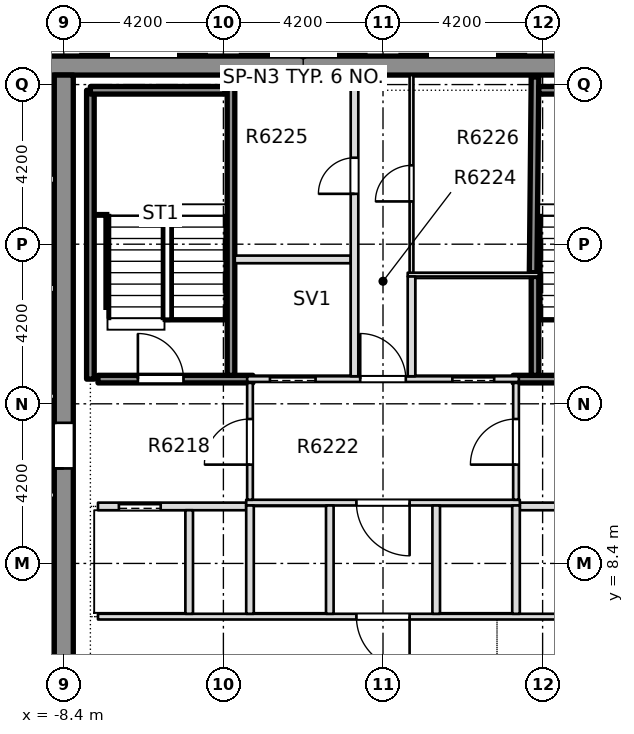
"""IFC4 building model, lengths in metres.
Left out: names, types, materials, properties, quantities, classifications, styles, units other than length and angle.
Written with IfcOpenShell. Run it as: python <this file> out.ifc"""

import sys

from ifc_helpers import new_model, si_unit, direction, frame, frame_2d, origin, place, context, subcontext, project, spatial, rectangle, extrude, element, fill, save


model = new_model("IFC4")
c1 = context("Model", 3, precision=1e-05, world=origin(), true_north=direction((0.0, 1.0)))
c2 = subcontext(c1, "Body", "Model", "MODEL_VIEW")
j1 = project(units=[si_unit("LENGTHUNIT", "METRE"), si_unit("PLANEANGLEUNIT", "RADIAN")], contexts=[c1])
p1 = place(None, origin())
s1 = spatial("IfcSite", under=j1, at=p1, CompositionType="ELEMENT")
p2 = place(p1, origin())
s2 = spatial("IfcBuilding", under=s1, at=p2, CompositionType="ELEMENT")
p3 = place(p2, frame((0.0, 0.0, 237.25)))
s3 = spatial("IfcBuildingStorey", under=s2, at=p3, CompositionType="ELEMENT", Elevation=237.25)
p4 = place(p3, frame((-12.1, 21.5, -0.4), z_axis=(0.0, 0.0, 1.0), x_axis=(1.0, 0.0, 0.0)))
e1 = element("IfcWall", 1, at=p4, inside=s3, PredefinedType="SHEAR", context=c2, shape_type="SweptSolid", body=[
    extrude(rectangle(XDim=24.2, YDim=0.5, at=frame_2d((12.1, 0.0))), origin(), (0.0, 0.0, 1.0), 3.45),
])
p5 = place(p3, frame((-8.4, -7.9, -0.4), z_axis=(0.0, 0.0, 1.0), x_axis=(0.0, 1.0, 0.0)))
e2 = element("IfcWall", 2, at=p5, inside=s3, PredefinedType="SHEAR", context=c2, shape_type="SweptSolid", body=[
    extrude(rectangle(XDim=29.15, YDim=0.5, at=frame_2d((14.575, 0.0))), origin(), (0.0, 0.0, 1.0), 3.45),
])
p6 = place(p5, frame((18.8, 0.0, 0.4)))
e3 = element("IfcOpeningElement", 3, at=p6, cuts=e2, PredefinedType="OPENING", context=c2, shape_type="SweptSolid", body=[
    extrude(rectangle(XDim=1.2, YDim=2.1, at=frame_2d((0.6, 1.05))), frame((0.0, 0.26, 0.0), z_axis=(0.0, -1.0, 0.0), x_axis=(1.0, 0.0, 0.0)), (0.0, 0.0, 1.0), 0.52),
])
p7 = place(p3, frame((-7.5, 7.0, 0.0), z_axis=(0.0, 0.0, 1.0), x_axis=(1.0, 0.0, 0.0)))
e4 = element("IfcWall", 4, at=p7, inside=s3, PredefinedType="PARTITIONING", context=c2, shape_type="SweptSolid", body=[
    extrude(rectangle(XDim=15.0, YDim=0.15, at=frame_2d((7.5, 0.0))), origin(), (0.0, 0.0, 1.0), 3.05),
])
p8 = place(p7, frame((6.8, 0.0, 0.0)))
e5 = element("IfcOpeningElement", 5, at=p8, cuts=e4, PredefinedType="OPENING", context=c2, shape_type="SweptSolid", body=[
    extrude(rectangle(XDim=1.4, YDim=2.1, at=frame_2d((0.7, 1.05))), frame((0.0, 0.085, 0.0), z_axis=(0.0, -1.0, 0.0), x_axis=(1.0, 0.0, 0.0)), (0.0, 0.0, 1.0), 0.17),
])
p9 = place(p3, frame((-7.5, 9.9, 0.0), z_axis=(0.0, 0.0, 1.0), x_axis=(1.0, 0.0, 0.0)))
e6 = element("IfcWall", 6, at=p9, inside=s3, PredefinedType="PARTITIONING", context=c2, shape_type="SweptSolid", body=[
    extrude(rectangle(XDim=3.9, YDim=0.2, at=frame_2d((1.95, 0.0))), origin(), (0.0, 0.0, 1.0), 3.05),
])
p10 = place(p9, frame((0.55, 0.0, 0.0)))
e7 = element("IfcOpeningElement", 7, at=p10, cuts=e6, PredefinedType="OPENING", context=c2, shape_type="SweptSolid", body=[
    extrude(rectangle(XDim=1.1, YDim=2.1, at=frame_2d((0.55, 1.05))), frame((0.0, 0.11, 0.0), z_axis=(0.0, -1.0, 0.0), x_axis=(1.0, 0.0, 0.0)), (0.0, 0.0, 1.0), 0.22),
])
p11 = place(p3, frame((3.6, 9.9, 0.0), z_axis=(0.0, 0.0, 1.0), x_axis=(1.0, 0.0, 0.0)))
e8 = element("IfcWall", 8, at=p11, inside=s3, PredefinedType="PARTITIONING", context=c2, shape_type="SweptSolid", body=[
    extrude(rectangle(XDim=3.9, YDim=0.2, at=frame_2d((1.95, 0.0))), origin(), (0.0, 0.0, 1.0), 3.05),
])
p12 = place(p11, frame((2.25, 0.0, 0.0)))
e9 = element("IfcOpeningElement", 9, at=p12, cuts=e8, PredefinedType="OPENING", context=c2, shape_type="SweptSolid", body=[
    extrude(rectangle(XDim=1.1, YDim=2.1, at=frame_2d((0.55, 1.05))), frame((0.0, 0.11, 0.0), z_axis=(0.0, -1.0, 0.0), x_axis=(1.0, 0.0, 0.0)), (0.0, 0.0, 1.0), 0.22),
])
p13 = place(p3, frame((-3.6, 10.0, 0.0), z_axis=(0.0, 0.0, 1.0), x_axis=(1.0, 0.0, 0.0)))
e10 = element("IfcWall", 10, at=p13, inside=s3, PredefinedType="PARTITIONING", context=c2, shape_type="SweptSolid", body=[
    extrude(rectangle(XDim=7.2, YDim=0.15, at=frame_2d((3.6, 0.0))), origin(), (0.0, 0.0, 1.0), 3.05),
])
p14 = place(p13, frame((2.9, 0.0, 0.0)))
e11 = element("IfcOpeningElement", 11, at=p14, cuts=e10, PredefinedType="OPENING", context=c2, shape_type="SweptSolid", body=[
    extrude(rectangle(XDim=1.4, YDim=2.1, at=frame_2d((0.7, 1.05))), frame((0.0, 0.085, 0.0), z_axis=(0.0, -1.0, 0.0), x_axis=(1.0, 0.0, 0.0)), (0.0, 0.0, 1.0), 0.17),
])
p15 = place(p3, frame((-7.5, 13.25, 0.0), z_axis=(0.0, 0.0, 1.0), x_axis=(1.0, 0.0, 0.0)))
e12 = element("IfcWall", 12, at=p15, inside=s3, PredefinedType="SOLIDWALL", context=c2, shape_type="SweptSolid", body=[
    extrude(rectangle(XDim=4.075, YDim=0.2, at=frame_2d((2.038, 0.0))), origin(), (0.0, 0.0, 1.0), 3.05),
])
p16 = place(p15, frame((1.05, 0.0, 0.0)))
e13 = element("IfcOpeningElement", 13, at=p16, cuts=e12, PredefinedType="OPENING", context=c2, shape_type="SweptSolid", body=[
    extrude(rectangle(XDim=1.2, YDim=2.1, at=frame_2d((0.6, 1.05))), frame((0.0, 0.11, 0.0), z_axis=(0.0, -1.0, 0.0), x_axis=(1.0, 0.0, 0.0)), (0.0, 0.0, 1.0), 0.22),
])
p17 = place(p3, frame((-3.575, 13.25, 0.0), z_axis=(0.0, 0.0, 1.0), x_axis=(1.0, 0.0, 0.0)))
e14 = element("IfcWall", 14, at=p17, inside=s3, PredefinedType="PARTITIONING", context=c2, shape_type="SweptSolid", body=[
    extrude(rectangle(XDim=7.15, YDim=0.15, at=frame_2d((3.575, 0.0))), origin(), (0.0, 0.0, 1.0), 3.05),
])
p18 = place(p17, frame((0.6, 0.0, 0.0)))
e15 = element("IfcOpeningElement", 15, at=p18, cuts=e14, PredefinedType="OPENING", context=c2, shape_type="SweptSolid", body=[
    extrude(rectangle(XDim=1.2, YDim=2.1, at=frame_2d((0.6, 1.05))), frame((0.0, 0.085, 0.0), z_axis=(0.0, -1.0, 0.0), x_axis=(1.0, 0.0, 0.0)), (0.0, 0.0, 1.0), 0.17),
])
p19 = place(p17, frame((5.4, 0.0, 0.0)))
e16 = element("IfcOpeningElement", 16, at=p19, cuts=e14, PredefinedType="OPENING", context=c2, shape_type="SweptSolid", body=[
    extrude(rectangle(XDim=1.1, YDim=2.1, at=frame_2d((0.55, 1.05))), frame((0.0, 0.085, 0.0), z_axis=(0.0, -1.0, 0.0), x_axis=(1.0, 0.0, 0.0)), (0.0, 0.0, 1.0), 0.17),
])
p20 = place(p17, frame((2.975, 0.0, 0.0)))
e17 = element("IfcOpeningElement", 17, at=p20, cuts=e14, PredefinedType="OPENING", context=c2, shape_type="SweptSolid", body=[
    extrude(rectangle(XDim=1.2, YDim=2.1, at=frame_2d((0.6, 1.05))), frame((0.0, 0.085, 0.0), z_axis=(0.0, -1.0, 0.0), x_axis=(1.0, 0.0, 0.0)), (0.0, 0.0, 1.0), 0.17),
])
p21 = place(p3, frame((3.425, 13.25, 0.0), z_axis=(0.0, 0.0, 1.0), x_axis=(1.0, 0.0, 0.0)))
e18 = element("IfcWall", 18, at=p21, inside=s3, PredefinedType="SOLIDWALL", context=c2, shape_type="SweptSolid", body=[
    extrude(rectangle(XDim=4.075, YDim=0.2, at=frame_2d((2.038, 0.0))), origin(), (0.0, 0.0, 1.0), 3.05),
])
p22 = place(p21, frame((1.825, 0.0, 0.0)))
e19 = element("IfcOpeningElement", 19, at=p22, cuts=e18, PredefinedType="OPENING", context=c2, shape_type="SweptSolid", body=[
    extrude(rectangle(XDim=1.2, YDim=2.1, at=frame_2d((0.6, 1.05))), frame((0.0, 0.11, 0.0), z_axis=(0.0, -1.0, 0.0), x_axis=(1.0, 0.0, 0.0)), (0.0, 0.0, 1.0), 0.22),
])
p23 = place(p3, frame((0.65, 16.0, 0.0), z_axis=(0.0, 0.0, 1.0), x_axis=(1.0, 0.0, 0.0)))
e20 = element("IfcWall", 20, at=p23, inside=s3, PredefinedType="PARTITIONING", context=c2, shape_type="SweptSolid", body=[
    extrude(rectangle(XDim=3.45, YDim=0.1, at=frame_2d((1.725, 0.0))), origin(), (0.0, 0.0, 1.0), 3.05),
])
p24 = place(p3, frame((-3.9, 16.4, 0.0), z_axis=(0.0, 0.0, 1.0), x_axis=(1.0, 0.0, 0.0)))
e21 = element("IfcWall", 21, at=p24, inside=s3, PredefinedType="PARTITIONING", context=c2, shape_type="SweptSolid", body=[
    extrude(rectangle(XDim=3.05, YDim=0.2, at=frame_2d((1.525, 0.0))), origin(), (0.0, 0.0, 1.0), 3.05),
])
p25 = place(p3, frame((-5.1, 7.075, 0.0), z_axis=(0.0, 0.0, 1.0), x_axis=(0.0, 1.0, 0.0)))
e22 = element("IfcWall", 22, at=p25, inside=s3, PredefinedType="PARTITIONING", context=c2, shape_type="SweptSolid", body=[
    extrude(rectangle(XDim=2.725, YDim=0.2, at=frame_2d((1.363, 0.0))), origin(), (0.0, 0.0, 1.0), 3.05),
])
p26 = place(p3, frame((-4.0, 13.35, 0.0), z_axis=(0.0, 0.0, 1.0), x_axis=(0.0, 1.0, 0.0)))
e23 = element("IfcWall", 23, at=p26, inside=s3, PredefinedType="SOLIDWALL", context=c2, shape_type="SweptSolid", body=[
    extrude(rectangle(XDim=7.899, YDim=0.2, at=frame_2d((3.949, 0.0))), origin(), (0.0, 0.0, 1.0), 3.05),
])
p27 = place(p3, frame((-3.5, 7.075, 0.0), z_axis=(0.0, 0.0, 1.0), x_axis=(0.0, 1.0, 0.0)))
e24 = element("IfcWall", 24, at=p27, inside=s3, PredefinedType="PARTITIONING", context=c2, shape_type="SweptSolid", body=[
    extrude(rectangle(XDim=2.85, YDim=0.2, at=frame_2d((1.425, 0.0))), origin(), (0.0, 0.0, 1.0), 3.05),
])
p28 = place(p3, frame((-3.5, 10.075, 0.0), z_axis=(0.0, 0.0, 1.0), x_axis=(0.0, 1.0, 0.0)))
e25 = element("IfcWall", 25, at=p28, inside=s3, PredefinedType="PARTITIONING", context=c2, shape_type="SweptSolid", body=[
    extrude(rectangle(XDim=3.075, YDim=0.15, at=frame_2d((1.538, 0.0))), origin(), (0.0, 0.0, 1.0), 3.05),
])
p29 = place(p28, frame((0.925, 0.0, 0.0)))
e26 = element("IfcOpeningElement", 26, at=p29, cuts=e25, PredefinedType="OPENING", context=c2, shape_type="SweptSolid", body=[
    extrude(rectangle(XDim=1.2, YDim=2.1, at=frame_2d((0.6, 1.05))), frame((0.0, 0.085, 0.0), z_axis=(0.0, -1.0, 0.0), x_axis=(1.0, 0.0, 0.0)), (0.0, 0.0, 1.0), 0.17),
])
p30 = place(p3, frame((-1.4, 7.075, 0.0), z_axis=(0.0, 0.0, 1.0), x_axis=(0.0, 1.0, 0.0)))
e27 = element("IfcWall", 27, at=p30, inside=s3, PredefinedType="PARTITIONING", context=c2, shape_type="SweptSolid", body=[
    extrude(rectangle(XDim=2.85, YDim=0.2, at=frame_2d((1.425, 0.0))), origin(), (0.0, 0.0, 1.0), 3.05),
])
p31 = place(p3, frame((-0.75, 13.325, 0.0), z_axis=(0.0, 0.0, 1.0), x_axis=(0.0, 1.0, 0.0)))
e28 = element("IfcWall", 28, at=p31, inside=s3, PredefinedType="PARTITIONING", context=c2, shape_type="SweptSolid", body=[
    extrude(rectangle(XDim=7.924, YDim=0.2, at=frame_2d((3.962, 0.0))), origin(), (0.0, 0.0, 1.0), 3.05),
])
p32 = place(p31, frame((4.8, 0.0, 0.0)))
e29 = element("IfcOpeningElement", 29, at=p32, cuts=e28, PredefinedType="OPENING", context=c2, shape_type="SweptSolid", body=[
    extrude(rectangle(XDim=0.95, YDim=2.1, at=frame_2d((0.475, 1.05))), frame((0.0, 0.11, 0.0), z_axis=(0.0, -1.0, 0.0), x_axis=(1.0, 0.0, 0.0)), (0.0, 0.0, 1.0), 0.22),
])
p33 = place(p3, frame((0.75, 13.325, 0.0), z_axis=(0.0, 0.0, 1.0), x_axis=(0.0, 1.0, 0.0)))
e30 = element("IfcWall", 30, at=p33, inside=s3, PredefinedType="PARTITIONING", context=c2, shape_type="SweptSolid", body=[
    extrude(rectangle(XDim=2.625, YDim=0.2, at=frame_2d((1.312, 0.0))), origin(), (0.0, 0.0, 1.0), 3.05),
])
p34 = place(p3, frame((0.75, 16.05, 0.0), z_axis=(0.0, 0.0, 1.0), x_axis=(0.0, 1.0, 0.0)))
e31 = element("IfcWall", 31, at=p34, inside=s3, PredefinedType="PARTITIONING", context=c2, shape_type="SweptSolid", body=[
    extrude(rectangle(XDim=5.199, YDim=0.1, at=frame_2d((2.6, 0.0))), origin(), (0.0, 0.0, 1.0), 3.05),
])
p35 = place(p34, frame((1.875, 0.0, 0.0)))
e32 = element("IfcOpeningElement", 32, at=p35, cuts=e31, PredefinedType="OPENING", context=c2, shape_type="SweptSolid", body=[
    extrude(rectangle(XDim=0.95, YDim=2.1, at=frame_2d((0.475, 1.05))), frame((0.0, 0.06, 0.0), z_axis=(0.0, -1.0, 0.0), x_axis=(1.0, 0.0, 0.0)), (0.0, 0.0, 1.0), 0.12),
])
for number, where, z_axis, x_axis in (
    (33, (1.4, 7.075, 0.0), (0.0, 0.0, 1.0), (0.0, 1.0, 0.0)),
    (34, (3.5, 7.075, 0.0), (0.0, 0.0, 1.0), (0.0, 1.0, 0.0)),
):
    element("IfcWall", number, at=place(p3, frame(where, z_axis=z_axis, x_axis=x_axis)), inside=s3, PredefinedType="PARTITIONING", context=c2, shape_type="SweptSolid", body=[
        extrude(rectangle(XDim=2.85, YDim=0.2, at=frame_2d((1.425, 0.0))), origin(), (0.0, 0.0, 1.0), 3.05),
    ])
p36 = place(p3, frame((3.5, 10.075, 0.0), z_axis=(0.0, 0.0, 1.0), x_axis=(0.0, 1.0, 0.0)))
e35 = element("IfcWall", 35, at=p36, inside=s3, PredefinedType="PARTITIONING", context=c2, shape_type="SweptSolid", body=[
    extrude(rectangle(XDim=3.075, YDim=0.15, at=frame_2d((1.538, 0.0))), origin(), (0.0, 0.0, 1.0), 3.05),
])
p37 = place(p36, frame((0.925, 0.0, 0.0)))
e36 = element("IfcOpeningElement", 36, at=p37, cuts=e35, PredefinedType="OPENING", context=c2, shape_type="SweptSolid", body=[
    extrude(rectangle(XDim=1.2, YDim=2.1, at=frame_2d((0.6, 1.05))), frame((0.0, 0.085, 0.0), z_axis=(0.0, -1.0, 0.0), x_axis=(1.0, 0.0, 0.0)), (0.0, 0.0, 1.0), 0.17),
])
p38 = place(p3, frame((4.0, 13.35, 0.0), z_axis=(0.0, 0.0, 1.0), x_axis=(0.0, 1.0, 0.0)))
e37 = element("IfcWall", 37, at=p38, inside=s3, PredefinedType="SOLIDWALL", context=c2, shape_type="SweptSolid", body=[
    extrude(rectangle(XDim=2.6, YDim=0.2, at=frame_2d((1.3, 0.0))), origin(), (0.0, 0.0, 1.0), 3.05),
])
p39 = place(p3, frame((3.95, 16.05, 0.0), z_axis=(0.0, 0.0, 1.0), x_axis=(0.009719787395, 0.999952761751, 0.0)))
e38 = element("IfcWall", 38, at=p39, inside=s3, PredefinedType="SOLIDWALL", context=c2, shape_type="SweptSolid", body=[
    extrude(rectangle(XDim=5.149, YDim=0.2, at=frame_2d((2.575, 0.0))), origin(), (0.0, 0.0, 1.0), 3.05),
])
for number, where, z_axis, x_axis in (
    (39, (-12.099, 10.2, 0.0), (0.0, 0.0, 1.0), (1.0, 0.0, 0.0)),
    (40, (-12.099, 12.8, 0.0), (0.0, 0.0, 1.0), (1.0, 0.0, 0.0)),
):
    element("IfcWall", number, at=place(p3, frame(where, z_axis=z_axis, x_axis=x_axis)), inside=s3, PredefinedType="PARTITIONING", context=c2, shape_type="SweptSolid", body=[
        extrude(rectangle(XDim=3.448, YDim=0.15, at=frame_2d((1.724, 0.0))), origin(), (0.0, 0.0, 1.0), 3.05),
    ])
for number, where, z_axis, x_axis in (
    (41, (-12.099, 15.637, 0.0), (0.0, 0.0, 1.0), (1.0, 0.0, 0.0)),
    (42, (-12.099, 18.509, 0.0), (0.0, 0.0, 1.0), (1.0, 0.0, 0.0)),
):
    element("IfcWall", number, at=place(p3, frame(where, z_axis=z_axis, x_axis=x_axis)), inside=s3, PredefinedType="PARTITIONING", context=c2, shape_type="SweptSolid", body=[
        extrude(rectangle(XDim=3.448, YDim=0.2, at=frame_2d((1.724, 0.0))), origin(), (0.0, 0.0, 1.0), 3.05),
    ])
p40 = place(p3, frame((-7.7, 13.25, 0.0), z_axis=(0.0, 0.0, 1.0), x_axis=(0.0, 1.0, 0.0)))
e43 = element("IfcWall", 43, at=p40, inside=s3, PredefinedType="SOLIDWALL", context=c2, shape_type="SweptSolid", body=[
    extrude(rectangle(XDim=7.6, YDim=0.2, at=frame_2d((3.8, 0.0))), origin(), (0.0, 0.0, 1.0), 3.05),
])
p41 = place(p3, frame((-7.7, 20.85, 0.0), z_axis=(0.0, 0.0, 1.0), x_axis=(1.0, 0.0, 0.0)))
e44 = element("IfcWall", 44, at=p41, inside=s3, PredefinedType="SOLIDWALL", context=c2, shape_type="SweptSolid", body=[
    extrude(rectangle(XDim=3.55, YDim=0.2, at=frame_2d((1.775, 0.0))), origin(), (0.0, 0.0, 1.0), 3.05),
])
p42 = place(p3, frame((4.1, 20.85, 0.0), z_axis=(0.0, 0.0, 1.0), x_axis=(1.0, 0.0, 0.0)))
e45 = element("IfcWall", 45, at=p42, inside=s3, PredefinedType="SOLIDWALL", context=c2, shape_type="SweptSolid", body=[
    extrude(rectangle(XDim=3.6, YDim=0.2, at=frame_2d((1.8, 0.0))), origin(), (0.0, 0.0, 1.0), 3.05),
])
p43 = place(p16, origin())
e46 = element("IfcDoor", 46, at=p43, inside=s3, OperationType="SINGLE_SWING_LEFT", PredefinedType="DOOR", context=c2, shape_type="SweptSolid", body=[
    extrude(rectangle(XDim=1.2, YDim=2.1, at=frame_2d((0.6, 1.05))), frame((0.0, 0.025, 0.0), z_axis=(0.0, -1.0, 0.0), x_axis=(1.0, 0.0, 0.0)), (0.0, 0.0, 1.0), 0.05),
])
fill(e13, e46)
p44 = place(p10, origin())
e47 = element("IfcDoor", 47, at=p44, inside=s3, OperationType="SLIDING_TO_RIGHT", PredefinedType="DOOR", context=c2, shape_type="SweptSolid", body=[
    extrude(rectangle(XDim=1.1, YDim=2.1, at=frame_2d((0.55, 1.05))), frame((0.0, 0.025, 0.0), z_axis=(0.0, -1.0, 0.0), x_axis=(1.0, 0.0, 0.0)), (0.0, 0.0, 1.0), 0.05),
])
fill(e7, e47)
p45 = place(p8, origin())
e48 = element("IfcDoor", 48, at=p45, inside=s3, OperationType="SINGLE_SWING_RIGHT", PredefinedType="DOOR", context=c2, shape_type="SweptSolid", body=[
    extrude(rectangle(XDim=1.4, YDim=2.1, at=frame_2d((0.7, 1.05))), frame((0.0, 0.025, 0.0), z_axis=(0.0, -1.0, 0.0), x_axis=(1.0, 0.0, 0.0)), (0.0, 0.0, 1.0), 0.05),
])
fill(e5, e48)
p46 = place(p14, origin())
e49 = element("IfcDoor", 49, at=p46, inside=s3, OperationType="SINGLE_SWING_RIGHT", PredefinedType="DOOR", context=c2, shape_type="SweptSolid", body=[
    extrude(rectangle(XDim=1.4, YDim=2.1, at=frame_2d((0.7, 1.05))), frame((0.0, 0.025, 0.0), z_axis=(0.0, -1.0, 0.0), x_axis=(1.0, 0.0, 0.0)), (0.0, 0.0, 1.0), 0.05),
])
fill(e11, e49)
p47 = place(p18, origin())
e50 = element("IfcDoor", 50, at=p47, inside=s3, OperationType="SLIDING_TO_RIGHT", PredefinedType="DOOR", context=c2, shape_type="SweptSolid", body=[
    extrude(rectangle(XDim=1.2, YDim=2.1, at=frame_2d((0.6, 1.05))), frame((0.0, 0.025, 0.0), z_axis=(0.0, -1.0, 0.0), x_axis=(1.0, 0.0, 0.0)), (0.0, 0.0, 1.0), 0.05),
])
fill(e15, e50)
p48 = place(p19, origin())
e51 = element("IfcDoor", 51, at=p48, inside=s3, OperationType="SLIDING_TO_LEFT", PredefinedType="DOOR", context=c2, shape_type="SweptSolid", body=[
    extrude(rectangle(XDim=1.1, YDim=2.1, at=frame_2d((0.55, 1.05))), frame((0.0, 0.025, 0.0), z_axis=(0.0, -1.0, 0.0), x_axis=(1.0, 0.0, 0.0)), (0.0, 0.0, 1.0), 0.05),
])
fill(e16, e51)
p49 = place(p20, origin())
e52 = element("IfcDoor", 52, at=p49, inside=s3, OperationType="SINGLE_SWING_RIGHT", PredefinedType="DOOR", context=c2, shape_type="SweptSolid", body=[
    extrude(rectangle(XDim=1.2, YDim=2.1, at=frame_2d((0.6, 1.05))), frame((0.0, 0.025, 0.0), z_axis=(0.0, -1.0, 0.0), x_axis=(1.0, 0.0, 0.0)), (0.0, 0.0, 1.0), 0.05),
])
fill(e17, e52)
p50 = place(p32, origin())
e53 = element("IfcDoor", 53, at=p50, inside=s3, OperationType="SINGLE_SWING_RIGHT", PredefinedType="DOOR", context=c2, shape_type="SweptSolid", body=[
    extrude(rectangle(XDim=0.95, YDim=2.1, at=frame_2d((0.475, 1.05))), frame((0.0, 0.025, 0.0), z_axis=(0.0, -1.0, 0.0), x_axis=(1.0, 0.0, 0.0)), (0.0, 0.0, 1.0), 0.05),
])
fill(e29, e53)
p51 = place(p35, origin())
e54 = element("IfcDoor", 54, at=p51, inside=s3, OperationType="SINGLE_SWING_LEFT", PredefinedType="DOOR", context=c2, shape_type="SweptSolid", body=[
    extrude(rectangle(XDim=0.95, YDim=2.1, at=frame_2d((0.475, 1.05))), frame((0.0, 0.025, 0.0), z_axis=(0.0, -1.0, 0.0), x_axis=(1.0, 0.0, 0.0)), (0.0, 0.0, 1.0), 0.05),
])
fill(e32, e54)
p52 = place(p29, origin())
e55 = element("IfcDoor", 55, at=p52, inside=s3, OperationType="SINGLE_SWING_RIGHT", PredefinedType="DOOR", context=c2, shape_type="SweptSolid", body=[
    extrude(rectangle(XDim=1.2, YDim=2.1, at=frame_2d((0.6, 1.05))), frame((0.0, 0.025, 0.0), z_axis=(0.0, -1.0, 0.0), x_axis=(1.0, 0.0, 0.0)), (0.0, 0.0, 1.0), 0.05),
])
fill(e26, e55)
p53 = place(p37, origin())
e56 = element("IfcDoor", 56, at=p53, inside=s3, OperationType="SINGLE_SWING_LEFT", PredefinedType="DOOR", context=c2, shape_type="SweptSolid", body=[
    extrude(rectangle(XDim=1.2, YDim=2.1, at=frame_2d((0.6, 1.05))), frame((0.0, 0.025, 0.0), z_axis=(0.0, -1.0, 0.0), x_axis=(1.0, 0.0, 0.0)), (0.0, 0.0, 1.0), 0.05),
])
fill(e36, e56)
p54 = place(p6, origin())
e57 = element("IfcDoor", 57, at=p54, inside=s3, OperationType="SINGLE_SWING_LEFT", PredefinedType="DOOR", context=c2, shape_type="SweptSolid", body=[
    extrude(rectangle(XDim=1.2, YDim=2.1, at=frame_2d((0.6, 1.05))), frame((0.0, 0.025, 0.0), z_axis=(0.0, -1.0, 0.0), x_axis=(1.0, 0.0, 0.0)), (0.0, 0.0, 1.0), 0.05),
])
fill(e3, e57)
save(model, sys.argv[1])
